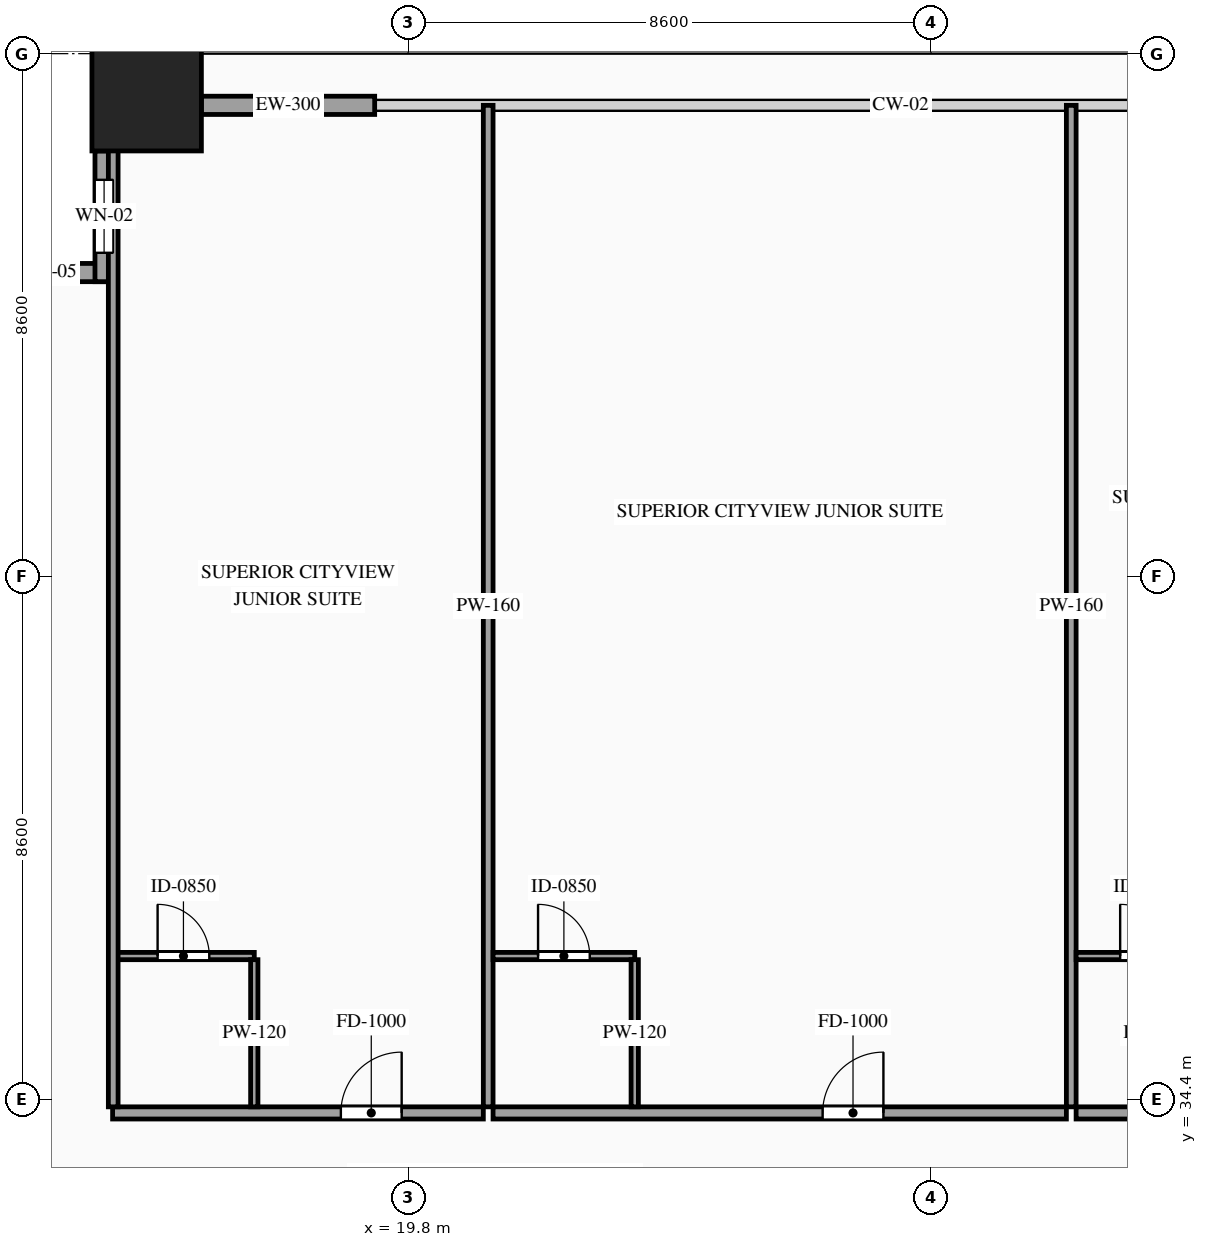
"""IFC4 building model, lengths in metres.
Left out: names, types, materials, properties, quantities, classifications, styles, units other than length and angle.
Written with IfcOpenShell. Run it as: python <this file> out.ifc"""

import sys

from ifc_helpers import new_model, si_unit, direction, frame, frame_2d, origin, origin_2d, place, context, subcontext, project, spatial, rectangle, hollow_rectangle, extrude, source, transform, mapped, element, fill, save


model = new_model("IFC4")
c1 = context("Model", 3, precision=1e-05, world=origin(), true_north=direction((0.0, 1.0)))
c2 = subcontext(c1, "Body", "Model", "MODEL_VIEW")
j1 = project(units=[si_unit("LENGTHUNIT", "METRE"), si_unit("PLANEANGLEUNIT", "RADIAN")], contexts=[c1])
p1 = place(None, origin())
s1 = spatial("IfcSite", under=j1, at=p1, CompositionType="ELEMENT")
p2 = place(p1, origin())
s2 = spatial("IfcBuilding", under=s1, at=p2, CompositionType="ELEMENT")
p3 = place(p2, frame((0.0, 0.0, 74.8)))
s3 = spatial("IfcBuildingStorey", under=s2, at=p3, CompositionType="ELEMENT", Elevation=74.8)
m1 = source(origin(), c2, "Body", "SweptSolid", [
    extrude(hollow_rectangle(XDim=1.8, YDim=1.8, WallThickness=0.08, at=origin_2d()), origin(), (0.0, 0.0, 1.0), 3.6),
])
p4 = place(p3, frame((15.5, 50.9, 0.0), z_axis=(0.0, 0.0, 1.0), x_axis=(1.0, 0.0, 0.0)))
e1 = element("IfcColumn", 1, at=p4, inside=s3, PredefinedType="COLUMN", context=c2, shape_type="MappedRepresentation", body=[
    mapped(m1, transform((0.0, 0.0, 0.0), scale=1.0)),
])
p5 = place(p3, frame((14.95, 48.0, 0.0), z_axis=(0.0, 0.0, 1.0), x_axis=(-1.0, 0.0, 0.0)))
e2 = element("IfcWall", 2, at=p5, inside=s3, PredefinedType="SOLIDWALL", context=c2, shape_type="SweptSolid", body=[
    extrude(rectangle(XDim=2.15, YDim=0.3, at=frame_2d((1.075, 0.0))), origin(), (0.0, 0.0, 1.0), 3.38),
])
p6 = place(p5, frame((0.625, 0.0, 0.85)))
e3 = element("IfcOpeningElement", 3, at=p6, cuts=e2, PredefinedType="OPENING", context=c2, shape_type="SweptSolid", body=[
    extrude(rectangle(XDim=0.9, YDim=1.5, at=frame_2d((0.45, 0.75))), frame((0.0, 0.165, 0.0), z_axis=(0.0, -1.0, 0.0), x_axis=(1.0, 0.0, 0.0)), (0.0, 0.0, 1.0), 0.33),
])
p7 = place(p3, frame((14.8, 50.0, 0.0), z_axis=(0.0, 0.0, 1.0), x_axis=(0.0, -1.0, 0.0)))
e4 = element("IfcWall", 4, at=p7, inside=s3, PredefinedType="SOLIDWALL", context=c2, shape_type="SweptSolid", body=[
    extrude(rectangle(XDim=2.15, YDim=0.3, at=frame_2d((1.075, 0.0))), origin(), (0.0, 0.0, 1.0), 3.38),
])
p8 = place(p7, frame((0.475, 0.0, 0.85)))
e5 = element("IfcOpeningElement", 5, at=p8, cuts=e4, PredefinedType="OPENING", context=c2, shape_type="SweptSolid", body=[
    extrude(rectangle(XDim=1.2, YDim=2.1, at=frame_2d((0.6, 1.05))), frame((0.0, 0.165, 0.0), z_axis=(0.0, -1.0, 0.0), x_axis=(1.0, 0.0, 0.0)), (0.0, 0.0, 1.0), 0.33),
])
m2 = source(origin(), c2, "Body", "SweptSolid", [
    extrude(rectangle(XDim=2.85, YDim=0.3, at=frame_2d((1.425, 0.0))), origin(), (0.0, 0.0, 1.0), 2.775),
])
p9 = place(p3, frame((16.4, 50.75, 0.0), z_axis=(0.0, 0.0, 1.0), x_axis=(1.0, 0.0, 0.0)))
e6 = element("IfcWall", 6, at=p9, inside=s3, PredefinedType="SOLIDWALL", context=c2, shape_type="MappedRepresentation", body=[
    mapped(m2, transform((0.0, 0.0, 0.0), scale=1.0)),
])
p10 = place(p3, frame((14.94, 34.18, 0.0), z_axis=(0.0, 0.0, 1.0), x_axis=(1.0, 0.0, 0.0)))
e7 = element("IfcWall", 7, at=p10, inside=s3, PredefinedType="PARTITIONING", context=c2, shape_type="SweptSolid", body=[
    extrude(rectangle(XDim=6.097, YDim=0.2, at=frame_2d((3.049, 0.0))), origin(), (0.0, 0.0, 1.0), 3.38),
])
p11 = place(p10, frame((3.754, 0.0, 0.0)))
e8 = element("IfcOpeningElement", 8, at=p11, cuts=e7, PredefinedType="OPENING", context=c2, shape_type="SweptSolid", body=[
    extrude(rectangle(XDim=1.0, YDim=2.2, at=frame_2d((0.5, 1.1))), frame((0.0, 0.115, 0.0), z_axis=(0.0, -1.0, 0.0), x_axis=(1.0, 0.0, 0.0)), (0.0, 0.0, 1.0), 0.23),
])
m3 = source(origin(), c2, "Body", "SweptSolid", [
    extrude(rectangle(XDim=16.47, YDim=0.16, at=frame_2d((8.235, 0.0))), origin(), (0.0, 0.0, 1.0), 3.38),
])
p12 = place(p3, frame((21.117, 34.28, 0.0), z_axis=(0.0, 0.0, 1.0), x_axis=(0.0, 1.0, 0.0)))
e9 = element("IfcWall", 9, at=p12, inside=s3, PredefinedType="PARTITIONING", context=c2, shape_type="MappedRepresentation", body=[
    mapped(m3, transform((0.0, 0.0, 0.0), scale=1.0)),
])
p13 = place(p3, frame((14.94, 36.76, 0.0), z_axis=(0.0, 0.0, 1.0), x_axis=(1.0, 0.0, 0.0)))
e10 = element("IfcWall", 10, at=p13, inside=s3, PredefinedType="PARTITIONING", context=c2, shape_type="SweptSolid", body=[
    extrude(rectangle(XDim=2.33, YDim=0.12, at=frame_2d((1.165, 0.0))), origin(), (0.0, 0.0, 1.0), 3.38),
])
p14 = place(p13, frame((0.74, 0.0, 0.0)))
e11 = element("IfcOpeningElement", 11, at=p14, cuts=e10, PredefinedType="OPENING", context=c2, shape_type="SweptSolid", body=[
    extrude(rectangle(XDim=0.85, YDim=2.1, at=frame_2d((0.425, 1.05))), frame((0.0, 0.075, 0.0), z_axis=(0.0, -1.0, 0.0), x_axis=(1.0, 0.0, 0.0)), (0.0, 0.0, 1.0), 0.15),
])
m4 = source(origin(), c2, "Body", "SweptSolid", [
    extrude(rectangle(XDim=2.42, YDim=0.12, at=frame_2d((1.21, 0.0))), origin(), (0.0, 0.0, 1.0), 3.38),
])
p15 = place(p3, frame((17.27, 34.28, 0.0), z_axis=(0.0, 0.0, 1.0), x_axis=(0.0, 1.0, 0.0)))
e12 = element("IfcWall", 12, at=p15, inside=s3, PredefinedType="PARTITIONING", context=c2, shape_type="MappedRepresentation", body=[
    mapped(m4, transform((0.0, 0.0, 0.0), scale=1.0)),
])
p16 = place(p3, frame((21.197, 34.18, 0.0), z_axis=(0.0, 0.0, 1.0), x_axis=(1.0, 0.0, 0.0)))
e13 = element("IfcWall", 13, at=p16, inside=s3, PredefinedType="PARTITIONING", context=c2, shape_type="SweptSolid", body=[
    extrude(rectangle(XDim=9.429, YDim=0.2, at=frame_2d((4.714, 0.0))), origin(), (0.0, 0.0, 1.0), 3.38),
])
p17 = place(p16, frame((5.42, 0.0, 0.0)))
e14 = element("IfcOpeningElement", 14, at=p17, cuts=e13, PredefinedType="OPENING", context=c2, shape_type="SweptSolid", body=[
    extrude(rectangle(XDim=1.0, YDim=2.2, at=frame_2d((0.5, 1.1))), frame((0.0, 0.115, 0.0), z_axis=(0.0, -1.0, 0.0), x_axis=(1.0, 0.0, 0.0)), (0.0, 0.0, 1.0), 0.23),
])
p18 = place(p3, frame((30.706, 34.28, 0.0), z_axis=(0.0, 0.0, 1.0), x_axis=(0.0, 1.0, 0.0)))
e15 = element("IfcWall", 15, at=p18, inside=s3, PredefinedType="PARTITIONING", context=c2, shape_type="MappedRepresentation", body=[
    mapped(m3, transform((0.0, 0.0, 0.0), scale=1.0)),
])
p19 = place(p3, frame((21.197, 36.76, 0.0), z_axis=(0.0, 0.0, 1.0), x_axis=(1.0, 0.0, 0.0)))
e16 = element("IfcWall", 16, at=p19, inside=s3, PredefinedType="PARTITIONING", context=c2, shape_type="SweptSolid", body=[
    extrude(rectangle(XDim=2.33, YDim=0.12, at=frame_2d((1.165, 0.0))), origin(), (0.0, 0.0, 1.0), 3.38),
])
p20 = place(p19, frame((0.74, 0.0, 0.0)))
e17 = element("IfcOpeningElement", 17, at=p20, cuts=e16, PredefinedType="OPENING", context=c2, shape_type="SweptSolid", body=[
    extrude(rectangle(XDim=0.85, YDim=2.1, at=frame_2d((0.425, 1.05))), frame((0.0, 0.075, 0.0), z_axis=(0.0, -1.0, 0.0), x_axis=(1.0, 0.0, 0.0)), (0.0, 0.0, 1.0), 0.15),
])
p21 = place(p3, frame((23.527, 34.28, 0.0), z_axis=(0.0, 0.0, 1.0), x_axis=(0.0, 1.0, 0.0)))
e18 = element("IfcWall", 18, at=p21, inside=s3, PredefinedType="PARTITIONING", context=c2, shape_type="MappedRepresentation", body=[
    mapped(m4, transform((0.0, 0.0, 0.0), scale=1.0)),
])
p22 = place(p3, frame((30.786, 34.18, 0.0), z_axis=(0.0, 0.0, 1.0), x_axis=(1.0, 0.0, 0.0)))
e19 = element("IfcWall", 19, at=p22, inside=s3, PredefinedType="PARTITIONING", context=c2, shape_type="SweptSolid", body=[
    extrude(rectangle(XDim=4.369, YDim=0.2, at=frame_2d((2.185, 0.0))), origin(), (0.0, 0.0, 1.0), 3.38),
])
p23 = place(p22, frame((2.874, 0.0, 0.0)))
e20 = element("IfcOpeningElement", 20, at=p23, cuts=e19, PredefinedType="OPENING", context=c2, shape_type="SweptSolid", body=[
    extrude(rectangle(XDim=1.0, YDim=2.2, at=frame_2d((0.5, 1.1))), frame((0.0, 0.115, 0.0), z_axis=(0.0, -1.0, 0.0), x_axis=(1.0, 0.0, 0.0)), (0.0, 0.0, 1.0), 0.23),
])
p24 = place(p3, frame((30.786, 36.76, 0.0), z_axis=(0.0, 0.0, 1.0), x_axis=(1.0, 0.0, 0.0)))
e21 = element("IfcWall", 21, at=p24, inside=s3, PredefinedType="PARTITIONING", context=c2, shape_type="SweptSolid", body=[
    extrude(rectangle(XDim=2.299, YDim=0.12, at=frame_2d((1.149, 0.0))), origin(), (0.0, 0.0, 1.0), 3.38),
])
p25 = place(p24, frame((0.725, 0.0, 0.0)))
e22 = element("IfcOpeningElement", 22, at=p25, cuts=e21, PredefinedType="OPENING", context=c2, shape_type="SweptSolid", body=[
    extrude(rectangle(XDim=0.85, YDim=2.1, at=frame_2d((0.425, 1.05))), frame((0.0, 0.075, 0.0), z_axis=(0.0, -1.0, 0.0), x_axis=(1.0, 0.0, 0.0)), (0.0, 0.0, 1.0), 0.15),
])
m5 = source(origin(), c2, "Body", "SweptSolid", [
    extrude(rectangle(XDim=16.32, YDim=0.16, at=frame_2d((8.16, 0.0))), origin(), (0.0, 0.0, 1.0), 3.38),
])
p26 = place(p3, frame((14.95, 34.28, 0.0), z_axis=(0.0, 0.0, 1.0), x_axis=(0.0, 1.0, 0.0)))
e23 = element("IfcWall", 23, at=p26, inside=s3, PredefinedType="PARTITIONING", context=c2, shape_type="MappedRepresentation", body=[
    mapped(m5, transform((0.0, 0.0, 0.0), scale=1.0)),
])
m6 = source(origin(), c2, "Body", "SweptSolid", [
    extrude(rectangle(XDim=0.9, YDim=1.5, at=frame_2d((0.45, 0.75))), frame((0.0, 0.03, 0.0), z_axis=(0.0, -1.0, 0.0), x_axis=(1.0, 0.0, 0.0)), (0.0, 0.0, 1.0), 0.06),
])
p27 = place(p6, origin())
e24 = element("IfcWindow", 24, at=p27, inside=s3, PartitioningType="SINGLE_PANEL", PredefinedType="WINDOW", context=c2, shape_type="MappedRepresentation", body=[
    mapped(m6, transform((0.0, 0.0, 0.0), scale=1.0)),
])
fill(e3, e24)
m7 = source(origin(), c2, "Body", "SweptSolid", [
    extrude(rectangle(XDim=1.2, YDim=2.1, at=frame_2d((0.6, 1.05))), frame((0.0, 0.03, 0.0), z_axis=(0.0, -1.0, 0.0), x_axis=(1.0, 0.0, 0.0)), (0.0, 0.0, 1.0), 0.06),
])
p28 = place(p8, origin())
e25 = element("IfcWindow", 25, at=p28, inside=s3, PartitioningType="SINGLE_PANEL", PredefinedType="WINDOW", context=c2, shape_type="MappedRepresentation", body=[
    mapped(m7, transform((0.0, 0.0, 0.0), scale=1.0)),
])
fill(e5, e25)
m8 = source(origin(), c2, "Body", "SweptSolid", [
    extrude(rectangle(XDim=1.0, YDim=2.2, at=frame_2d((0.5, 1.1))), frame((0.0, 0.025, 0.0), z_axis=(0.0, -1.0, 0.0), x_axis=(1.0, 0.0, 0.0)), (0.0, 0.0, 1.0), 0.05),
])
p29 = place(p11, origin())
e26 = element("IfcDoor", 26, at=p29, inside=s3, OperationType="SINGLE_SWING_RIGHT", PredefinedType="DOOR", context=c2, shape_type="MappedRepresentation", body=[
    mapped(m8, transform((0.0, 0.0, 0.0), scale=1.0)),
])
fill(e8, e26)
m9 = source(origin(), c2, "Body", "SweptSolid", [
    extrude(rectangle(XDim=0.85, YDim=2.1, at=frame_2d((0.425, 1.05))), frame((0.0, 0.025, 0.0), z_axis=(0.0, -1.0, 0.0), x_axis=(1.0, 0.0, 0.0)), (0.0, 0.0, 1.0), 0.05),
])
p30 = place(p14, origin())
e27 = element("IfcDoor", 27, at=p30, inside=s3, OperationType="SINGLE_SWING_LEFT", PredefinedType="DOOR", context=c2, shape_type="MappedRepresentation", body=[
    mapped(m9, transform((0.0, 0.0, 0.0), scale=1.0)),
])
fill(e11, e27)
p31 = place(p17, origin())
e28 = element("IfcDoor", 28, at=p31, inside=s3, OperationType="SINGLE_SWING_RIGHT", PredefinedType="DOOR", context=c2, shape_type="MappedRepresentation", body=[
    mapped(m8, transform((0.0, 0.0, 0.0), scale=1.0)),
])
fill(e14, e28)
p32 = place(p20, origin())
e29 = element("IfcDoor", 29, at=p32, inside=s3, OperationType="SINGLE_SWING_LEFT", PredefinedType="DOOR", context=c2, shape_type="MappedRepresentation", body=[
    mapped(m9, transform((0.0, 0.0, 0.0), scale=1.0)),
])
fill(e17, e29)
p33 = place(p25, origin())
e30 = element("IfcDoor", 30, at=p33, inside=s3, OperationType="SINGLE_SWING_LEFT", PredefinedType="DOOR", context=c2, shape_type="MappedRepresentation", body=[
    mapped(m9, transform((0.0, 0.0, 0.0), scale=1.0)),
])
fill(e22, e30)
save(model, sys.argv[1])
